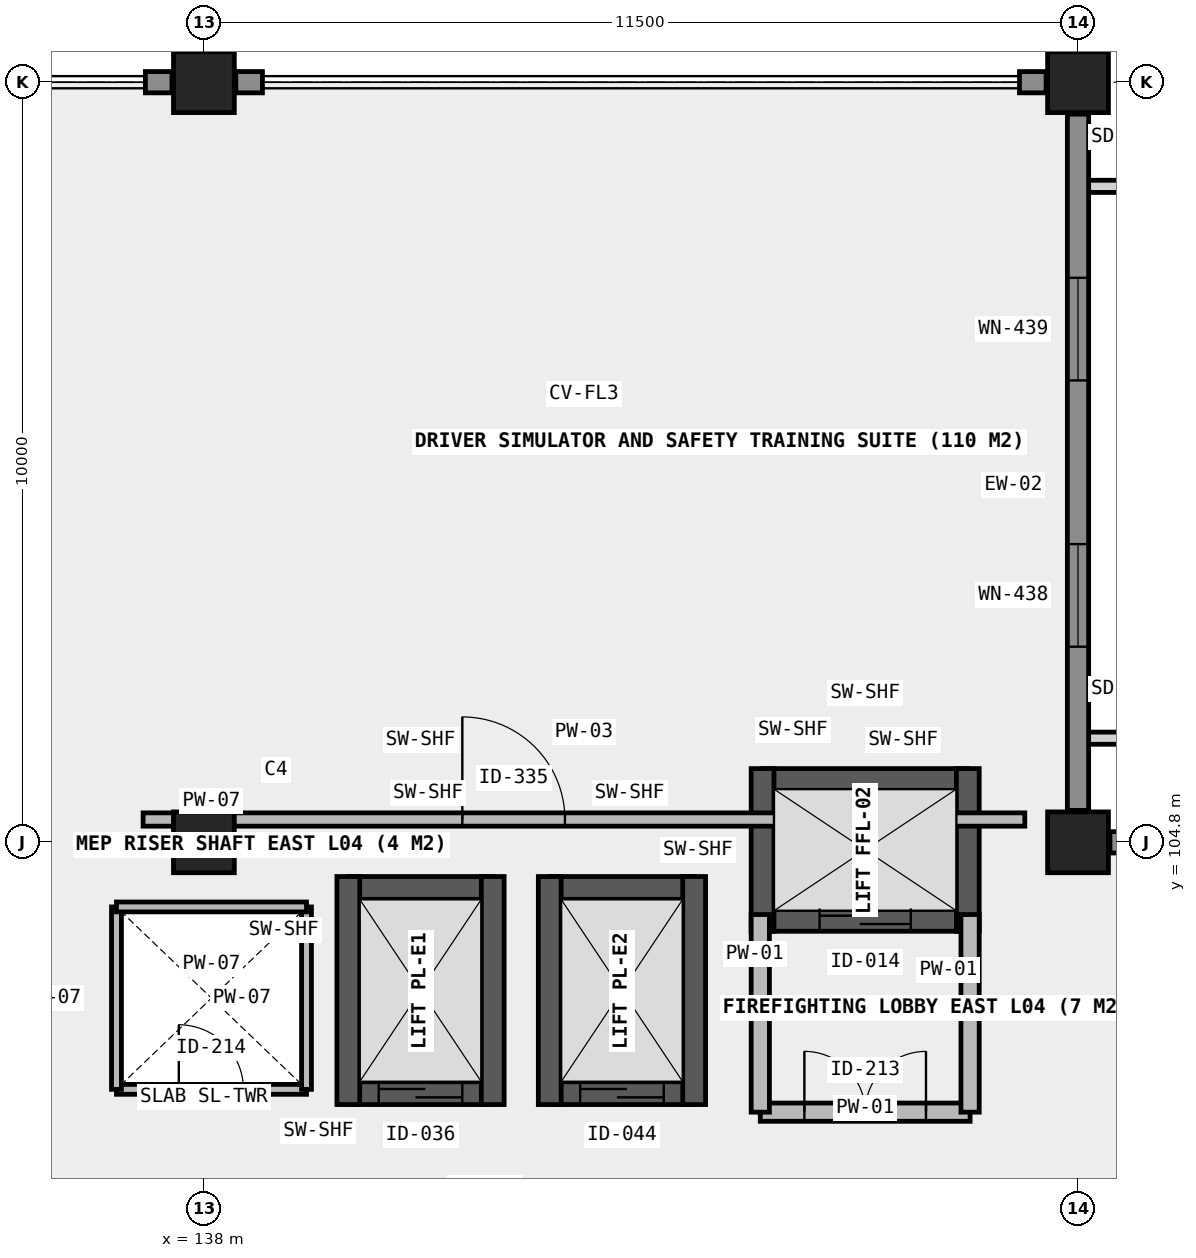
"""IFC4 building model, lengths in metres.
Left out: names, types, materials, properties, quantities, classifications, styles, units other than length and angle.
Written with IfcOpenShell. Run it as: python <this file> out.ifc"""

import sys

from ifc_helpers import new_model, si_unit, direction, frame, frame_2d, origin, origin_2d, place, context, subcontext, project, spatial, rectangle, extrude, element, fill, save


model = new_model("IFC4")
c1 = context("Model", 3, precision=1e-05, world=origin(), true_north=direction((0.0, 1.0)))
c2 = subcontext(c1, "Body", "Model", "MODEL_VIEW")
j1 = project(units=[si_unit("LENGTHUNIT", "METRE"), si_unit("PLANEANGLEUNIT", "RADIAN")], contexts=[c1])
p1 = place(None, origin())
s1 = spatial("IfcSite", under=j1, at=p1, CompositionType="ELEMENT")
p2 = place(p1, origin())
s2 = spatial("IfcBuilding", under=s1, at=p2, CompositionType="ELEMENT")
p3 = place(p2, frame((0.0, 0.0, 18.3)))
s3 = spatial("IfcBuildingStorey", under=s2, at=p3, CompositionType="ELEMENT", Elevation=18.3)
for number, where, z_axis, x_axis in (
    (1, (138.0, 104.8, 0.0), (0.0, 0.0, 1.0), (1.0, 0.0, 0.0)),
    (2, (138.0, 114.8, 0.0), (0.0, 0.0, 1.0), (1.0, 0.0, 0.0)),
    (3, (149.5, 104.8, 0.0), (0.0, 0.0, 1.0), (1.0, 0.0, 0.0)),
    (4, (149.5, 114.8, 0.0), (0.0, 0.0, 1.0), (1.0, 0.0, 0.0)),
):
    element("IfcColumn", number, at=place(p3, frame(where, z_axis=z_axis, x_axis=x_axis)), inside=s3, PredefinedType="COLUMN", context=c2, shape_type="SweptSolid", body=[
        extrude(rectangle(XDim=0.8, YDim=0.8, at=origin_2d()), origin(), (0.0, 0.0, 1.0), 4.16),
    ])
p4 = place(p3, frame((145.35, 103.78, 0.0), z_axis=(0.0, 0.0, 1.0), x_axis=(1.0, 0.0, 0.0)))
e5 = element("IfcWall", 5, at=p4, inside=s3, PredefinedType="SHEAR", context=c2, shape_type="SweptSolid", body=[
    extrude(rectangle(XDim=2.7, YDim=0.3, at=frame_2d((1.35, 0.0))), origin(), (0.0, 0.0, 1.0), 4.16),
])
p5 = place(p4, frame((0.75, 0.0, 0.0)))
e6 = element("IfcOpeningElement", 6, at=p5, cuts=e5, PredefinedType="OPENING", context=c2, shape_type="SweptSolid", body=[
    extrude(rectangle(XDim=1.2, YDim=2.15, at=frame_2d((0.6, 1.075))), frame((0.0, 0.16, 0.0), z_axis=(0.0, -1.0, 0.0), x_axis=(1.0, 0.0, 0.0)), (0.0, 0.0, 1.0), 0.32),
])
p6 = place(p3, frame((145.35, 105.62, 0.0), z_axis=(0.0, 0.0, 1.0), x_axis=(1.0, 0.0, 0.0)))
e7 = element("IfcWall", 7, at=p6, inside=s3, PredefinedType="SHEAR", context=c2, shape_type="SweptSolid", body=[
    extrude(rectangle(XDim=2.7, YDim=0.3, at=frame_2d((1.35, 0.0))), origin(), (0.0, 0.0, 1.0), 4.16),
])
for number, where, z_axis, x_axis in (
    (8, (145.35, 103.63, 0.0), (0.0, 0.0, 1.0), (0.0, 1.0, 0.0)),
    (9, (148.05, 103.63, 0.0), (0.0, 0.0, 1.0), (0.0, 1.0, 0.0)),
):
    element("IfcWall", number, at=place(p3, frame(where, z_axis=z_axis, x_axis=x_axis)), inside=s3, PredefinedType="SHEAR", context=c2, shape_type="SweptSolid", body=[
        extrude(rectangle(XDim=2.14, YDim=0.3, at=frame_2d((1.07, 0.0))), origin(), (0.0, 0.0, 1.0), 4.16),
    ])
p7 = place(p3, frame((139.9, 101.5, 0.0), z_axis=(0.0, 0.0, 1.0), x_axis=(1.0, 0.0, 0.0)))
e10 = element("IfcWall", 10, at=p7, inside=s3, PredefinedType="SHEAR", context=c2, shape_type="SweptSolid", body=[
    extrude(rectangle(XDim=1.9, YDim=0.3, at=frame_2d((0.95, 0.0))), origin(), (0.0, 0.0, 1.0), 4.16),
])
p8 = place(p7, frame((0.4, 0.0, 0.0)))
e11 = element("IfcOpeningElement", 11, at=p8, cuts=e10, PredefinedType="OPENING", context=c2, shape_type="SweptSolid", body=[
    extrude(rectangle(XDim=1.1, YDim=2.15, at=frame_2d((0.55, 1.075))), frame((0.0, 0.16, 0.0), z_axis=(0.0, -1.0, 0.0), x_axis=(1.0, 0.0, 0.0)), (0.0, 0.0, 1.0), 0.32),
])
p9 = place(p3, frame((139.9, 104.2, 0.0), z_axis=(0.0, 0.0, 1.0), x_axis=(1.0, 0.0, 0.0)))
e12 = element("IfcWall", 12, at=p9, inside=s3, PredefinedType="SHEAR", context=c2, shape_type="SweptSolid", body=[
    extrude(rectangle(XDim=1.9, YDim=0.3, at=frame_2d((0.95, 0.0))), origin(), (0.0, 0.0, 1.0), 4.16),
])
for number, where, z_axis, x_axis in (
    (13, (139.9, 101.35, 0.0), (0.0, 0.0, 1.0), (0.0, 1.0, 0.0)),
    (14, (141.8, 101.35, 0.0), (0.0, 0.0, 1.0), (0.0, 1.0, 0.0)),
):
    element("IfcWall", number, at=place(p3, frame(where, z_axis=z_axis, x_axis=x_axis)), inside=s3, PredefinedType="SHEAR", context=c2, shape_type="SweptSolid", body=[
        extrude(rectangle(XDim=3.0, YDim=0.3, at=frame_2d((1.5, 0.0))), origin(), (0.0, 0.0, 1.0), 4.16),
    ])
p10 = place(p3, frame((142.55, 101.5, 0.0), z_axis=(0.0, 0.0, 1.0), x_axis=(1.0, 0.0, 0.0)))
e15 = element("IfcWall", 15, at=p10, inside=s3, PredefinedType="SHEAR", context=c2, shape_type="SweptSolid", body=[
    extrude(rectangle(XDim=1.9, YDim=0.3, at=frame_2d((0.95, 0.0))), origin(), (0.0, 0.0, 1.0), 4.16),
])
p11 = place(p10, frame((0.4, 0.0, 0.0)))
e16 = element("IfcOpeningElement", 16, at=p11, cuts=e15, PredefinedType="OPENING", context=c2, shape_type="SweptSolid", body=[
    extrude(rectangle(XDim=1.1, YDim=2.15, at=frame_2d((0.55, 1.075))), frame((0.0, 0.16, 0.0), z_axis=(0.0, -1.0, 0.0), x_axis=(1.0, 0.0, 0.0)), (0.0, 0.0, 1.0), 0.32),
])
p12 = place(p3, frame((142.55, 104.2, 0.0), z_axis=(0.0, 0.0, 1.0), x_axis=(1.0, 0.0, 0.0)))
e17 = element("IfcWall", 17, at=p12, inside=s3, PredefinedType="SHEAR", context=c2, shape_type="SweptSolid", body=[
    extrude(rectangle(XDim=1.9, YDim=0.3, at=frame_2d((0.95, 0.0))), origin(), (0.0, 0.0, 1.0), 4.16),
])
for number, where, z_axis, x_axis in (
    (18, (142.55, 101.35, 0.0), (0.0, 0.0, 1.0), (0.0, 1.0, 0.0)),
    (19, (144.45, 101.35, 0.0), (0.0, 0.0, 1.0), (0.0, 1.0, 0.0)),
):
    element("IfcWall", number, at=place(p3, frame(where, z_axis=z_axis, x_axis=x_axis)), inside=s3, PredefinedType="SHEAR", context=c2, shape_type="SweptSolid", body=[
        extrude(rectangle(XDim=3.0, YDim=0.3, at=frame_2d((1.5, 0.0))), origin(), (0.0, 0.0, 1.0), 4.16),
    ])
p13 = place(p3, frame((149.92, 104.8, 0.0), z_axis=(0.0, 0.0, 1.0), x_axis=(1.0, 0.0, 0.0)))
e20 = element("IfcWall", 20, at=p13, inside=s3, PredefinedType="SOLIDWALL", context=c2, shape_type="SweptSolid", body=[
    extrude(rectangle(XDim=10.66, YDim=0.28, at=frame_2d((5.33, 0.0))), origin(), (0.0, 0.0, 1.0), 3.1),
])
p14 = place(p13, frame((2.587, 0.0, 0.85)))
e21 = element("IfcOpeningElement", 21, at=p14, cuts=e20, PredefinedType="OPENING", context=c2, shape_type="SweptSolid", body=[
    extrude(rectangle(XDim=1.45, YDim=1.75, at=frame_2d((0.725, 0.875))), frame((0.0, 0.15, 0.0), z_axis=(0.0, -1.0, 0.0), x_axis=(1.0, 0.0, 0.0)), (0.0, 0.0, 1.0), 0.3),
])
p15 = place(p13, frame((6.623, 0.0, 0.85)))
e22 = element("IfcOpeningElement", 22, at=p15, cuts=e20, PredefinedType="OPENING", context=c2, shape_type="SweptSolid", body=[
    extrude(rectangle(XDim=1.45, YDim=1.75, at=frame_2d((0.725, 0.875))), frame((0.0, 0.15, 0.0), z_axis=(0.0, -1.0, 0.0), x_axis=(1.0, 0.0, 0.0)), (0.0, 0.0, 1.0), 0.3),
])
p16 = place(p3, frame((149.5, 105.22, 0.0), z_axis=(0.0, 0.0, 1.0), x_axis=(0.0, 1.0, 0.0)))
e23 = element("IfcWall", 23, at=p16, inside=s3, PredefinedType="SOLIDWALL", context=c2, shape_type="SweptSolid", body=[
    extrude(rectangle(XDim=9.16, YDim=0.28, at=frame_2d((4.58, 0.0))), origin(), (0.0, 0.0, 1.0), 3.1),
])
p17 = place(p16, frame((2.153, 0.0, 0.85)))
e24 = element("IfcOpeningElement", 24, at=p17, cuts=e23, PredefinedType="OPENING", context=c2, shape_type="SweptSolid", body=[
    extrude(rectangle(XDim=1.35, YDim=1.65, at=frame_2d((0.675, 0.825))), frame((0.0, 0.15, 0.0), z_axis=(0.0, -1.0, 0.0), x_axis=(1.0, 0.0, 0.0)), (0.0, 0.0, 1.0), 0.3),
])
p18 = place(p16, frame((5.657, 0.0, 0.85)))
e25 = element("IfcOpeningElement", 25, at=p18, cuts=e23, PredefinedType="OPENING", context=c2, shape_type="SweptSolid", body=[
    extrude(rectangle(XDim=1.35, YDim=1.65, at=frame_2d((0.675, 0.825))), frame((0.0, 0.15, 0.0), z_axis=(0.0, -1.0, 0.0), x_axis=(1.0, 0.0, 0.0)), (0.0, 0.0, 1.0), 0.3),
])
for number, where, z_axis, x_axis in (
    (26, (137.23, 114.8, 0.0), (0.0, 0.0, 1.0), (1.0, 0.0, 0.0)),
    (27, (138.42, 114.8, 0.0), (0.0, 0.0, 1.0), (1.0, 0.0, 0.0)),
    (28, (148.73, 114.8, 0.0), (0.0, 0.0, 1.0), (1.0, 0.0, 0.0)),
):
    element("IfcWall", number, at=place(p3, frame(where, z_axis=z_axis, x_axis=x_axis)), inside=s3, PredefinedType="SOLIDWALL", context=c2, shape_type="SweptSolid", body=[
        extrude(rectangle(XDim=0.35, YDim=0.28, at=frame_2d((0.175, 0.0))), origin(), (0.0, 0.0, 1.0), 3.89),
    ])
p19 = place(p3, frame((145.32, 101.25, 0.0), z_axis=(0.0, 0.0, 1.0), x_axis=(1.0, 0.0, 0.0)))
e29 = element("IfcWall", 29, at=p19, inside=s3, PredefinedType="SOLIDWALL", context=c2, shape_type="SweptSolid", body=[
    extrude(rectangle(XDim=2.76, YDim=0.24, at=frame_2d((1.38, 0.0))), origin(), (0.0, 0.0, 1.0), 3.88),
])
p20 = place(p19, frame((0.58, 0.0, 0.0)))
e30 = element("IfcOpeningElement", 30, at=p20, cuts=e29, PredefinedType="OPENING", context=c2, shape_type="SweptSolid", body=[
    extrude(rectangle(XDim=1.6, YDim=2.15, at=frame_2d((0.8, 1.075))), frame((0.0, 0.13, 0.0), z_axis=(0.0, -1.0, 0.0), x_axis=(1.0, 0.0, 0.0)), (0.0, 0.0, 1.0), 0.26),
])
for number, where, z_axis, x_axis in (
    (31, (145.32, 101.25, 0.0), (0.0, 0.0, 1.0), (0.0, 1.0, 0.0)),
    (32, (148.08, 101.25, 0.0), (0.0, 0.0, 1.0), (0.0, 1.0, 0.0)),
):
    element("IfcWall", number, at=place(p3, frame(where, z_axis=z_axis, x_axis=x_axis)), inside=s3, PredefinedType="SOLIDWALL", context=c2, shape_type="SweptSolid", body=[
        extrude(rectangle(XDim=2.6, YDim=0.24, at=frame_2d((1.3, 0.0))), origin(), (0.0, 0.0, 1.0), 3.88),
    ])
p21 = place(p3, frame((136.85, 101.55, 0.0), z_axis=(0.0, 0.0, 1.0), x_axis=(1.0, 0.0, 0.0)))
e33 = element("IfcWall", 33, at=p21, inside=s3, PredefinedType="PLUMBINGWALL", context=c2, shape_type="SweptSolid", body=[
    extrude(rectangle(XDim=2.5, YDim=0.13, at=frame_2d((1.25, 0.0))), origin(), (0.0, 0.0, 1.0), 3.88),
])
p22 = place(p21, frame((0.82, 0.0, 0.0)))
e34 = element("IfcOpeningElement", 34, at=p22, cuts=e33, PredefinedType="OPENING", context=c2, shape_type="SweptSolid", body=[
    extrude(rectangle(XDim=0.85, YDim=2.0, at=frame_2d((0.425, 1.0))), frame((0.0, 0.075, 0.0), z_axis=(0.0, -1.0, 0.0), x_axis=(1.0, 0.0, 0.0)), (0.0, 0.0, 1.0), 0.15),
])
for number, where, z_axis, x_axis in (
    (35, (136.85, 101.55, 0.0), (0.0, 0.0, 1.0), (0.0, 1.0, 0.0)),
    (36, (139.35, 101.55, 0.0), (0.0, 0.0, 1.0), (0.0, 1.0, 0.0)),
):
    element("IfcWall", number, at=place(p3, frame(where, z_axis=z_axis, x_axis=x_axis)), inside=s3, PredefinedType="PLUMBINGWALL", context=c2, shape_type="SweptSolid", body=[
        extrude(rectangle(XDim=2.4, YDim=0.13, at=frame_2d((1.2, 0.0))), origin(), (0.0, 0.0, 1.0), 3.88),
    ])
p23 = place(p3, frame((136.85, 103.95, 0.0), z_axis=(0.0, 0.0, 1.0), x_axis=(1.0, 0.0, 0.0)))
e37 = element("IfcWall", 37, at=p23, inside=s3, PredefinedType="PLUMBINGWALL", context=c2, shape_type="SweptSolid", body=[
    extrude(rectangle(XDim=2.5, YDim=0.13, at=frame_2d((1.25, 0.0))), origin(), (0.0, 0.0, 1.0), 3.88),
])
p24 = place(p3, frame((137.2, 105.1, 0.0), z_axis=(0.0, 0.0, 1.0), x_axis=(1.0, 0.0, 0.0)))
e38 = element("IfcWall", 38, at=p24, inside=s3, PredefinedType="PARTITIONING", context=c2, shape_type="SweptSolid", body=[
    extrude(rectangle(XDim=11.6, YDim=0.175, at=frame_2d((5.8, 0.0))), origin(), (0.0, 0.0, 1.0), 3.88),
])
p25 = place(p24, frame((4.2, 0.0, 0.0)))
e39 = element("IfcOpeningElement", 39, at=p25, cuts=e38, PredefinedType="OPENING", context=c2, shape_type="SweptSolid", body=[
    extrude(rectangle(XDim=1.35, YDim=2.2, at=frame_2d((0.675, 1.1))), frame((0.0, 0.098, 0.0), z_axis=(0.0, -1.0, 0.0), x_axis=(1.0, 0.0, 0.0)), (0.0, 0.0, 1.0), 0.195),
])
p26 = place(p17, origin())
e40 = element("IfcWindow", 40, at=p26, inside=s3, PartitioningType="SINGLE_PANEL", PredefinedType="WINDOW", context=c2, shape_type="SweptSolid", body=[
    extrude(rectangle(XDim=1.35, YDim=1.65, at=frame_2d((0.675, 0.825))), frame((0.0, 0.03, 0.0), z_axis=(0.0, -1.0, 0.0), x_axis=(1.0, 0.0, 0.0)), (0.0, 0.0, 1.0), 0.06),
])
fill(e24, e40)
p27 = place(p18, origin())
e41 = element("IfcWindow", 41, at=p27, inside=s3, PartitioningType="SINGLE_PANEL", PredefinedType="WINDOW", context=c2, shape_type="SweptSolid", body=[
    extrude(rectangle(XDim=1.35, YDim=1.65, at=frame_2d((0.675, 0.825))), frame((0.0, 0.03, 0.0), z_axis=(0.0, -1.0, 0.0), x_axis=(1.0, 0.0, 0.0)), (0.0, 0.0, 1.0), 0.06),
])
fill(e25, e41)
p28 = place(p5, origin())
e42 = element("IfcDoor", 42, at=p28, inside=s3, OperationType="SLIDING_TO_RIGHT", PredefinedType="DOOR", context=c2, shape_type="SweptSolid", body=[
    extrude(rectangle(XDim=1.2, YDim=2.15, at=frame_2d((0.6, 1.075))), frame((0.0, 0.025, 0.0), z_axis=(0.0, -1.0, 0.0), x_axis=(1.0, 0.0, 0.0)), (0.0, 0.0, 1.0), 0.05),
])
fill(e6, e42)
p29 = place(p8, origin())
e43 = element("IfcDoor", 43, at=p29, inside=s3, OperationType="SLIDING_TO_LEFT", PredefinedType="DOOR", context=c2, shape_type="SweptSolid", body=[
    extrude(rectangle(XDim=1.1, YDim=2.15, at=frame_2d((0.55, 1.075))), frame((0.0, 0.025, 0.0), z_axis=(0.0, -1.0, 0.0), x_axis=(1.0, 0.0, 0.0)), (0.0, 0.0, 1.0), 0.05),
])
fill(e11, e43)
p30 = place(p11, origin())
e44 = element("IfcDoor", 44, at=p30, inside=s3, OperationType="SLIDING_TO_LEFT", PredefinedType="DOOR", context=c2, shape_type="SweptSolid", body=[
    extrude(rectangle(XDim=1.1, YDim=2.15, at=frame_2d((0.55, 1.075))), frame((0.0, 0.025, 0.0), z_axis=(0.0, -1.0, 0.0), x_axis=(1.0, 0.0, 0.0)), (0.0, 0.0, 1.0), 0.05),
])
fill(e16, e44)
p31 = place(p20, origin())
e45 = element("IfcDoor", 45, at=p31, inside=s3, OperationType="DOUBLE_DOOR_SINGLE_SWING", PredefinedType="DOOR", context=c2, shape_type="SweptSolid", body=[
    extrude(rectangle(XDim=1.6, YDim=2.15, at=frame_2d((0.8, 1.075))), frame((0.0, 0.025, 0.0), z_axis=(0.0, -1.0, 0.0), x_axis=(1.0, 0.0, 0.0)), (0.0, 0.0, 1.0), 0.05),
])
fill(e30, e45)
p32 = place(p22, origin())
e46 = element("IfcDoor", 46, at=p32, inside=s3, OperationType="SINGLE_SWING_LEFT", PredefinedType="TRAPDOOR", context=c2, shape_type="SweptSolid", body=[
    extrude(rectangle(XDim=0.85, YDim=2.0, at=frame_2d((0.425, 1.0))), frame((0.0, 0.025, 0.0), z_axis=(0.0, -1.0, 0.0), x_axis=(1.0, 0.0, 0.0)), (0.0, 0.0, 1.0), 0.05),
])
fill(e34, e46)
p33 = place(p25, origin())
e47 = element("IfcDoor", 47, at=p33, inside=s3, OperationType="SINGLE_SWING_LEFT", PredefinedType="DOOR", context=c2, shape_type="SweptSolid", body=[
    extrude(rectangle(XDim=1.35, YDim=2.2, at=frame_2d((0.675, 1.1))), frame((0.0, 0.025, 0.0), z_axis=(0.0, -1.0, 0.0), x_axis=(1.0, 0.0, 0.0)), (0.0, 0.0, 1.0), 0.05),
])
fill(e39, e47)
save(model, sys.argv[1])
